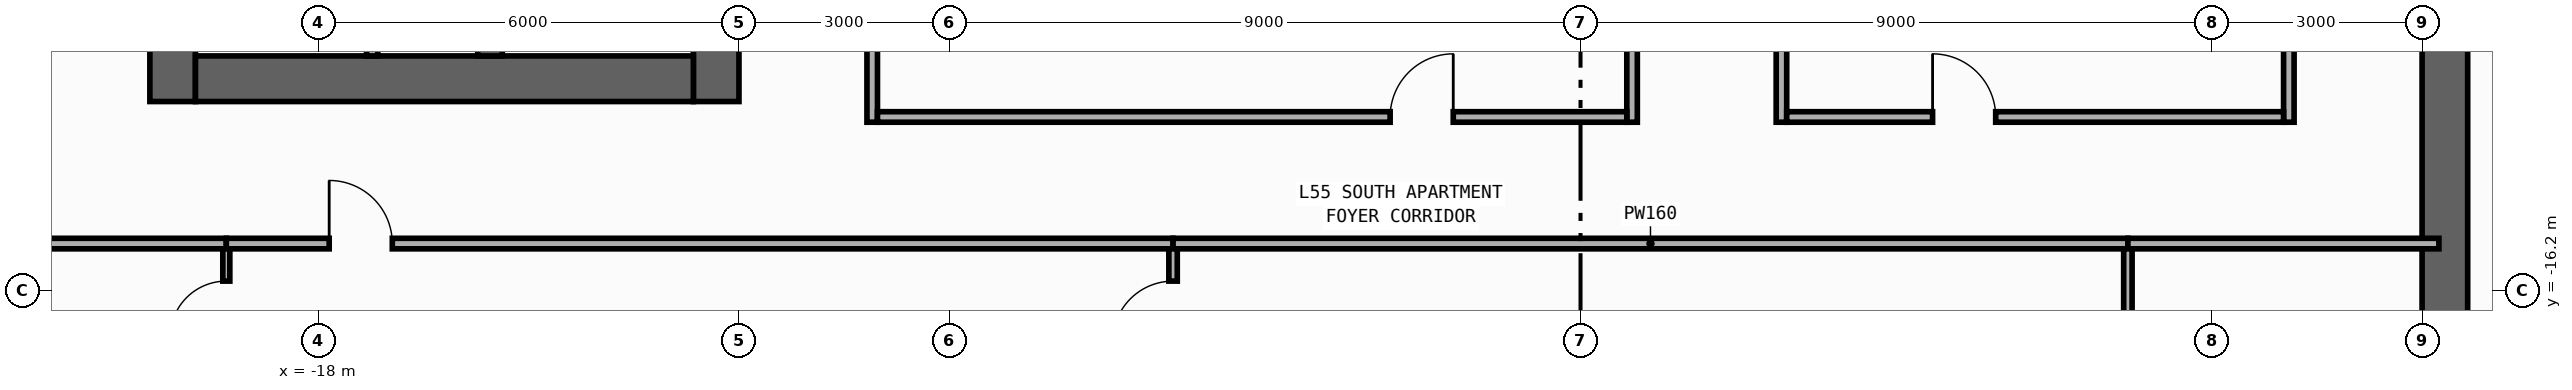
"""IFC4 building model, lengths in metres.
Left out: names, types, materials, properties, quantities, classifications, styles, units other than length and angle.
Written with IfcOpenShell. Run it as: python <this file> out.ifc"""

import sys

from ifc_helpers import new_model, si_unit, direction, frame, frame_2d, origin, place, context, subcontext, project, spatial, rectangle, extrude, element, fill, save


model = new_model("IFC4")
c1 = context("Model", 3, precision=1e-05, world=origin(), true_north=direction((0.0, 1.0)))
c2 = subcontext(c1, "Body", "Model", "MODEL_VIEW")
j1 = project(units=[si_unit("LENGTHUNIT", "METRE"), si_unit("PLANEANGLEUNIT", "RADIAN")], contexts=[c1])
p1 = place(None, origin())
s1 = spatial("IfcSite", under=j1, at=p1, CompositionType="ELEMENT")
p2 = place(p1, origin())
s2 = spatial("IfcBuilding", under=s1, at=p2, CompositionType="ELEMENT")
p3 = place(p2, frame((0.0, 0.0, 236.8)))
s3 = spatial("IfcBuildingStorey", under=s2, at=p3, CompositionType="ELEMENT", Elevation=236.8)
p4 = place(p3, frame((-20.075, -13.5, 0.0), z_axis=(0.0, 0.0, 1.0), x_axis=(0.0, 1.0, 0.0)))
e1 = element("IfcWall", 1, at=p4, inside=s3, PredefinedType="SHEAR", context=c2, shape_type="SweptSolid", body=[
    extrude(rectangle(XDim=27.0, YDim=0.65, at=frame_2d((13.5, 0.0))), origin(), (0.0, 0.0, 1.0), 3.34),
])
p5 = place(p3, frame((-12.325, -13.5, 0.0), z_axis=(0.0, 0.0, 1.0), x_axis=(0.0, 1.0, 0.0)))
e2 = element("IfcWall", 2, at=p5, inside=s3, PredefinedType="SHEAR", context=c2, shape_type="SweptSolid", body=[
    extrude(rectangle(XDim=27.0, YDim=0.65, at=frame_2d((13.5, 0.0))), origin(), (0.0, 0.0, 1.0), 3.34),
])
p6 = place(p5, frame((15.175, 0.0, 0.0)))
e3 = element("IfcOpeningElement", 3, at=p6, cuts=e2, PredefinedType="OPENING", context=c2, shape_type="SweptSolid", body=[
    extrude(rectangle(XDim=0.85, YDim=2.1, at=frame_2d((0.425, 1.05))), frame((0.0, 0.335, 0.0), z_axis=(0.0, -1.0, 0.0), x_axis=(1.0, 0.0, 0.0)), (0.0, 0.0, 1.0), 0.67),
])
p7 = place(p5, frame((21.275, 0.0, 0.0)))
e4 = element("IfcOpeningElement", 4, at=p7, cuts=e2, PredefinedType="OPENING", context=c2, shape_type="SweptSolid", body=[
    extrude(rectangle(XDim=0.85, YDim=2.1, at=frame_2d((0.425, 1.05))), frame((0.0, 0.335, 0.0), z_axis=(0.0, -1.0, 0.0), x_axis=(1.0, 0.0, 0.0)), (0.0, 0.0, 1.0), 0.67),
])
p8 = place(p5, frame((4.275, 0.0, 0.0)))
e5 = element("IfcOpeningElement", 5, at=p8, cuts=e2, PredefinedType="OPENING", context=c2, shape_type="SweptSolid", body=[
    extrude(rectangle(XDim=0.85, YDim=2.1, at=frame_2d((0.425, 1.05))), frame((0.0, 0.335, 0.0), z_axis=(0.0, -1.0, 0.0), x_axis=(1.0, 0.0, 0.0)), (0.0, 0.0, 1.0), 0.67),
])
p9 = place(p5, frame((10.275, 0.0, 0.0)))
e6 = element("IfcOpeningElement", 6, at=p9, cuts=e2, PredefinedType="OPENING", context=c2, shape_type="SweptSolid", body=[
    extrude(rectangle(XDim=0.85, YDim=2.1, at=frame_2d((0.425, 1.05))), frame((0.0, 0.335, 0.0), z_axis=(0.0, -1.0, 0.0), x_axis=(1.0, 0.0, 0.0)), (0.0, 0.0, 1.0), 0.67),
])
p10 = place(p5, frame((12.725, 0.0, 0.0)))
e7 = element("IfcOpeningElement", 7, at=p10, cuts=e2, PredefinedType="OPENING", context=c2, shape_type="SweptSolid", body=[
    extrude(rectangle(XDim=1.15, YDim=2.2, at=frame_2d((0.575, 1.1))), frame((0.0, 0.335, 0.0), z_axis=(0.0, -1.0, 0.0), x_axis=(1.0, 0.0, 0.0)), (0.0, 0.0, 1.0), 0.67),
])
p11 = place(p5, frame((1.625, 0.0, 0.0)))
e8 = element("IfcOpeningElement", 8, at=p11, cuts=e2, PredefinedType="OPENING", context=c2, shape_type="SweptSolid", body=[
    extrude(rectangle(XDim=0.85, YDim=2.1, at=frame_2d((0.425, 1.05))), frame((0.0, 0.335, 0.0), z_axis=(0.0, -1.0, 0.0), x_axis=(1.0, 0.0, 0.0)), (0.0, 0.0, 1.0), 0.67),
])
p12 = place(p3, frame((-19.75, -13.175, 0.0), z_axis=(0.0, 0.0, 1.0), x_axis=(1.0, 0.0, 0.0)))
e9 = element("IfcWall", 9, at=p12, inside=s3, PredefinedType="SHEAR", context=c2, shape_type="SweptSolid", body=[
    extrude(rectangle(XDim=7.1, YDim=0.65, at=frame_2d((3.55, 0.0))), origin(), (0.0, 0.0, 1.0), 3.34),
])
p13 = place(p3, frame((-15.55, -12.85, 0.0), z_axis=(0.0, 0.0, 1.0), x_axis=(0.0, 1.0, 0.0)))
e10 = element("IfcWall", 10, at=p13, inside=s3, PredefinedType="SHEAR", context=c2, shape_type="SweptSolid", body=[
    extrude(rectangle(XDim=25.7, YDim=0.35, at=frame_2d((12.85, 0.0))), origin(), (0.0, 0.0, 1.0), 3.34),
])
p14 = place(p13, frame((12.075, 0.0, 0.0)))
e11 = element("IfcOpeningElement", 11, at=p14, cuts=e10, PredefinedType="OPENING", context=c2, shape_type="SweptSolid", body=[
    extrude(rectangle(XDim=1.15, YDim=2.2, at=frame_2d((0.575, 1.1))), frame((0.0, 0.185, 0.0), z_axis=(0.0, -1.0, 0.0), x_axis=(1.0, 0.0, 0.0)), (0.0, 0.0, 1.0), 0.37),
])
p15 = place(p13, frame((0.975, 0.0, 0.0)))
e12 = element("IfcOpeningElement", 12, at=p15, cuts=e10, PredefinedType="OPENING", context=c2, shape_type="SweptSolid", body=[
    extrude(rectangle(XDim=0.85, YDim=2.1, at=frame_2d((0.425, 1.05))), frame((0.0, 0.185, 0.0), z_axis=(0.0, -1.0, 0.0), x_axis=(1.0, 0.0, 0.0)), (0.0, 0.0, 1.0), 0.37),
])
p16 = place(p3, frame((12.325, -19.8, 0.0), z_axis=(0.0, 0.0, 1.0), x_axis=(0.0, 1.0, 0.0)))
e13 = element("IfcWall", 13, at=p16, inside=s3, PredefinedType="SHEAR", context=c2, shape_type="SweptSolid", body=[
    extrude(rectangle(XDim=27.0, YDim=0.65, at=frame_2d((13.5, 0.0))), origin(), (0.0, 0.0, 1.0), 3.34),
])
p17 = place(p16, frame((23.05, 0.0, 0.0)))
e14 = element("IfcOpeningElement", 14, at=p17, cuts=e13, PredefinedType="OPENING", context=c2, shape_type="SweptSolid", body=[
    extrude(rectangle(XDim=1.1, YDim=2.2, at=frame_2d((0.55, 1.1))), frame((0.0, 0.335, 0.0), z_axis=(0.0, -1.0, 0.0), x_axis=(1.0, 0.0, 0.0)), (0.0, 0.0, 1.0), 0.67),
])
p18 = place(p16, frame((19.85, 0.0, 0.0)))
e15 = element("IfcOpeningElement", 15, at=p18, cuts=e13, PredefinedType="OPENING", context=c2, shape_type="SweptSolid", body=[
    extrude(rectangle(XDim=1.1, YDim=2.2, at=frame_2d((0.55, 1.1))), frame((0.0, 0.335, 0.0), z_axis=(0.0, -1.0, 0.0), x_axis=(1.0, 0.0, 0.0)), (0.0, 0.0, 1.0), 0.67),
])
p19 = place(p16, frame((16.65, 0.0, 0.0)))
e16 = element("IfcOpeningElement", 16, at=p19, cuts=e13, PredefinedType="OPENING", context=c2, shape_type="SweptSolid", body=[
    extrude(rectangle(XDim=1.1, YDim=2.2, at=frame_2d((0.55, 1.1))), frame((0.0, 0.335, 0.0), z_axis=(0.0, -1.0, 0.0), x_axis=(1.0, 0.0, 0.0)), (0.0, 0.0, 1.0), 0.67),
])
p20 = place(p16, frame((10.175, 0.0, 0.0)))
e17 = element("IfcOpeningElement", 17, at=p20, cuts=e13, PredefinedType="OPENING", context=c2, shape_type="SweptSolid", body=[
    extrude(rectangle(XDim=0.85, YDim=2.1, at=frame_2d((0.425, 1.05))), frame((0.0, 0.335, 0.0), z_axis=(0.0, -1.0, 0.0), x_axis=(1.0, 0.0, 0.0)), (0.0, 0.0, 1.0), 0.67),
])
p21 = place(p16, frame((12.725, 0.0, 0.0)))
e18 = element("IfcOpeningElement", 18, at=p21, cuts=e13, PredefinedType="OPENING", context=c2, shape_type="SweptSolid", body=[
    extrude(rectangle(XDim=1.15, YDim=2.2, at=frame_2d((0.575, 1.1))), frame((0.0, 0.335, 0.0), z_axis=(0.0, -1.0, 0.0), x_axis=(1.0, 0.0, 0.0)), (0.0, 0.0, 1.0), 0.67),
])
p22 = place(p16, frame((25.125, 0.0, 0.0)))
e19 = element("IfcOpeningElement", 19, at=p22, cuts=e13, PredefinedType="OPENING", context=c2, shape_type="SweptSolid", body=[
    extrude(rectangle(XDim=0.85, YDim=2.1, at=frame_2d((0.425, 1.05))), frame((0.0, 0.335, 0.0), z_axis=(0.0, -1.0, 0.0), x_axis=(1.0, 0.0, 0.0)), (0.0, 0.0, 1.0), 0.67),
])
p23 = place(p3, frame((-17.23, -12.85, 0.0), z_axis=(0.0, 0.0, 1.0), x_axis=(0.0, 1.0, 0.0)))
e20 = element("IfcWall", 20, at=p23, inside=s3, PredefinedType="PARTITIONING", context=c2, shape_type="SweptSolid", body=[
    extrude(rectangle(XDim=2.38, YDim=0.16, at=frame_2d((1.19, 0.0))), origin(), (0.0, 0.0, 1.0), 3.34),
])
p24 = place(p23, frame((0.46, 0.0, 0.0)))
e21 = element("IfcOpeningElement", 21, at=p24, cuts=e20, PredefinedType="OPENING", context=c2, shape_type="SweptSolid", body=[
    extrude(rectangle(XDim=0.85, YDim=2.1, at=frame_2d((0.425, 1.05))), frame((0.0, 0.09, 0.0), z_axis=(0.0, -1.0, 0.0), x_axis=(1.0, 0.0, 0.0)), (0.0, 0.0, 1.0), 0.18),
])
p25 = place(p3, frame((-10.1, -13.795, 0.0), z_axis=(0.0, 0.0, 1.0), x_axis=(0.0, 1.0, 0.0)))
e22 = element("IfcWall", 22, at=p25, inside=s3, PredefinedType="PARTITIONING", context=c2, shape_type="SweptSolid", body=[
    extrude(rectangle(XDim=14.205, YDim=0.15, at=frame_2d((7.103, 0.0))), origin(), (0.0, 0.0, 1.0), 3.34),
])
p26 = place(p25, frame((7.972, 0.0, 0.0)))
e23 = element("IfcOpeningElement", 23, at=p26, cuts=e22, PredefinedType="OPENING", context=c2, shape_type="SweptSolid", body=[
    extrude(rectangle(XDim=0.9, YDim=2.15, at=frame_2d((0.45, 1.075))), frame((0.0, 0.085, 0.0), z_axis=(0.0, -1.0, 0.0), x_axis=(1.0, 0.0, 0.0)), (0.0, 0.0, 1.0), 0.17),
])
p27 = place(p3, frame((10.1, -13.795, 0.0), z_axis=(0.0, 0.0, 1.0), x_axis=(0.0, 1.0, 0.0)))
e24 = element("IfcWall", 24, at=p27, inside=s3, PredefinedType="PARTITIONING", context=c2, shape_type="SweptSolid", body=[
    extrude(rectangle(XDim=11.575, YDim=0.15, at=frame_2d((5.788, 0.0))), origin(), (0.0, 0.0, 1.0), 3.34),
])
p28 = place(p27, frame((7.979, 0.0, 0.0)))
e25 = element("IfcOpeningElement", 25, at=p28, cuts=e24, PredefinedType="OPENING", context=c2, shape_type="SweptSolid", body=[
    extrude(rectangle(XDim=0.9, YDim=2.15, at=frame_2d((0.45, 1.075))), frame((0.0, 0.085, 0.0), z_axis=(0.0, -1.0, 0.0), x_axis=(1.0, 0.0, 0.0)), (0.0, 0.0, 1.0), 0.17),
])
p29 = place(p3, frame((0.735, -13.795, 0.0), z_axis=(0.0, 0.0, 1.0), x_axis=(0.0, 1.0, 0.0)))
e26 = element("IfcWall", 26, at=p29, inside=s3, PredefinedType="PARTITIONING", context=c2, shape_type="SweptSolid", body=[
    extrude(rectangle(XDim=14.055, YDim=0.15, at=frame_2d((7.027, 0.0))), origin(), (0.0, 0.0, 1.0), 3.34),
])
p30 = place(p29, frame((7.881, 0.0, 0.0)))
e27 = element("IfcOpeningElement", 27, at=p30, cuts=e26, PredefinedType="OPENING", context=c2, shape_type="SweptSolid", body=[
    extrude(rectangle(XDim=0.9, YDim=2.15, at=frame_2d((0.45, 1.075))), frame((0.0, 0.085, 0.0), z_axis=(0.0, -1.0, 0.0), x_axis=(1.0, 0.0, 0.0)), (0.0, 0.0, 1.0), 0.17),
])
p31 = place(p3, frame((2.865, -13.795, 0.0), z_axis=(0.0, 0.0, 1.0), x_axis=(0.0, 1.0, 0.0)))
e28 = element("IfcWall", 28, at=p31, inside=s3, PredefinedType="PARTITIONING", context=c2, shape_type="SweptSolid", body=[
    extrude(rectangle(XDim=11.415, YDim=0.15, at=frame_2d((5.708, 0.0))), origin(), (0.0, 0.0, 1.0), 3.34),
])
p32 = place(p31, frame((8.013, 0.0, 0.0)))
e29 = element("IfcOpeningElement", 29, at=p32, cuts=e28, PredefinedType="OPENING", context=c2, shape_type="SweptSolid", body=[
    extrude(rectangle(XDim=0.9, YDim=2.15, at=frame_2d((0.45, 1.075))), frame((0.0, 0.085, 0.0), z_axis=(0.0, -1.0, 0.0), x_axis=(1.0, 0.0, 0.0)), (0.0, 0.0, 1.0), 0.17),
])
p33 = place(p3, frame((-21.955, -15.525, 0.0), z_axis=(0.0, 0.0, 1.0), x_axis=(1.0, 0.0, 0.0)))
e30 = element("IfcWall", 30, at=p33, inside=s3, PredefinedType="PARTITIONING", context=c2, shape_type="SweptSolid", body=[
    extrude(rectangle(XDim=2.645, YDim=0.15, at=frame_2d((1.323, 0.0))), origin(), (0.0, 0.0, 1.0), 3.34),
])
p34 = place(p3, frame((-19.31, -15.525, 0.0), z_axis=(0.0, 0.0, 1.0), x_axis=(1.0, 0.0, 0.0)))
e31 = element("IfcWall", 31, at=p34, inside=s3, PredefinedType="PARTITIONING", context=c2, shape_type="SweptSolid", body=[
    extrude(rectangle(XDim=13.5, YDim=0.15, at=frame_2d((6.75, 0.0))), origin(), (0.0, 0.0, 1.0), 3.34),
])
p35 = place(p34, frame((1.467, 0.0, 0.0)))
e32 = element("IfcOpeningElement", 32, at=p35, cuts=e31, PredefinedType="OPENING", context=c2, shape_type="SweptSolid", body=[
    extrude(rectangle(XDim=0.9, YDim=2.15, at=frame_2d((0.45, 1.075))), frame((0.0, 0.085, 0.0), z_axis=(0.0, -1.0, 0.0), x_axis=(1.0, 0.0, 0.0)), (0.0, 0.0, 1.0), 0.17),
])
p36 = place(p3, frame((-5.81, -15.525, 0.0), z_axis=(0.0, 0.0, 1.0), x_axis=(1.0, 0.0, 0.0)))
e33 = element("IfcWall", 33, at=p36, inside=s3, PredefinedType="PARTITIONING", context=c2, shape_type="SweptSolid", body=[
    extrude(rectangle(XDim=13.615, YDim=0.15, at=frame_2d((6.808, 0.0))), origin(), (0.0, 0.0, 1.0), 3.34),
])
p37 = place(p3, frame((7.805, -15.525, 0.0), z_axis=(0.0, 0.0, 1.0), x_axis=(1.0, 0.0, 0.0)))
e34 = element("IfcWall", 34, at=p37, inside=s3, PredefinedType="PARTITIONING", context=c2, shape_type="SweptSolid", body=[
    extrude(rectangle(XDim=4.435, YDim=0.15, at=frame_2d((2.218, 0.0))), origin(), (0.0, 0.0, 1.0), 3.34),
])
p38 = place(p3, frame((-10.025, -13.72, 0.0), z_axis=(0.0, 0.0, 1.0), x_axis=(1.0, 0.0, 0.0)))
e35 = element("IfcWall", 35, at=p38, inside=s3, PredefinedType="PARTITIONING", context=c2, shape_type="SweptSolid", body=[
    extrude(rectangle(XDim=10.685, YDim=0.15, at=frame_2d((5.342, 0.0))), origin(), (0.0, 0.0, 1.0), 3.34),
])
p39 = place(p38, frame((7.31, 0.0, 0.0)))
e36 = element("IfcOpeningElement", 36, at=p39, cuts=e35, PredefinedType="OPENING", context=c2, shape_type="SweptSolid", body=[
    extrude(rectangle(XDim=0.9, YDim=2.15, at=frame_2d((0.45, 1.075))), frame((0.0, 0.085, 0.0), z_axis=(0.0, -1.0, 0.0), x_axis=(1.0, 0.0, 0.0)), (0.0, 0.0, 1.0), 0.17),
])
p40 = place(p3, frame((2.94, -13.72, 0.0), z_axis=(0.0, 0.0, 1.0), x_axis=(1.0, 0.0, 0.0)))
e37 = element("IfcWall", 37, at=p40, inside=s3, PredefinedType="PARTITIONING", context=c2, shape_type="SweptSolid", body=[
    extrude(rectangle(XDim=7.085, YDim=0.15, at=frame_2d((3.542, 0.0))), origin(), (0.0, 0.0, 1.0), 3.34),
])
p41 = place(p40, frame((2.08, 0.0, 0.0)))
e38 = element("IfcOpeningElement", 38, at=p41, cuts=e37, PredefinedType="OPENING", context=c2, shape_type="SweptSolid", body=[
    extrude(rectangle(XDim=0.9, YDim=2.15, at=frame_2d((0.45, 1.075))), frame((0.0, 0.085, 0.0), z_axis=(0.0, -1.0, 0.0), x_axis=(1.0, 0.0, 0.0)), (0.0, 0.0, 1.0), 0.17),
])
p42 = place(p3, frame((-19.31, -18.1, 0.0), z_axis=(0.0, 0.0, 1.0), x_axis=(0.0, 1.0, 0.0)))
e39 = element("IfcWall", 39, at=p42, inside=s3, PredefinedType="PARTITIONING", context=c2, shape_type="SweptSolid", body=[
    extrude(rectangle(XDim=2.5, YDim=0.1, at=frame_2d((1.25, 0.0))), origin(), (0.0, 0.0, 1.0), 3.34),
])
p43 = place(p42, frame((1.24, 0.0, 0.0)))
e40 = element("IfcOpeningElement", 40, at=p43, cuts=e39, PredefinedType="OPENING", context=c2, shape_type="SweptSolid", body=[
    extrude(rectangle(XDim=0.8, YDim=2.1, at=frame_2d((0.4, 1.05))), frame((0.0, 0.06, 0.0), z_axis=(0.0, -1.0, 0.0), x_axis=(1.0, 0.0, 0.0)), (0.0, 0.0, 1.0), 0.12),
])
p44 = place(p3, frame((-5.81, -20.1, 0.0), z_axis=(0.0, 0.0, 1.0), x_axis=(0.0, 1.0, 0.0)))
e41 = element("IfcWall", 41, at=p44, inside=s3, PredefinedType="PARTITIONING", context=c2, shape_type="SweptSolid", body=[
    extrude(rectangle(XDim=4.5, YDim=0.12, at=frame_2d((2.25, 0.0))), origin(), (0.0, 0.0, 1.0), 3.34),
])
p45 = place(p44, frame((3.18, 0.0, 0.0)))
e42 = element("IfcOpeningElement", 42, at=p45, cuts=e41, PredefinedType="OPENING", context=c2, shape_type="SweptSolid", body=[
    extrude(rectangle(XDim=0.86, YDim=2.15, at=frame_2d((0.43, 1.075))), frame((0.0, 0.07, 0.0), z_axis=(0.0, -1.0, 0.0), x_axis=(1.0, 0.0, 0.0)), (0.0, 0.0, 1.0), 0.14),
])
p46 = place(p3, frame((7.805, -24.735, 0.0), z_axis=(0.0, 0.0, 1.0), x_axis=(0.0, 1.0, 0.0)))
e43 = element("IfcWall", 43, at=p46, inside=s3, PredefinedType="PARTITIONING", context=c2, shape_type="SweptSolid", body=[
    extrude(rectangle(XDim=9.135, YDim=0.12, at=frame_2d((4.568, 0.0))), origin(), (0.0, 0.0, 1.0), 3.34),
])
p47 = place(p46, frame((0.46, 0.0, 0.0)))
e44 = element("IfcOpeningElement", 44, at=p47, cuts=e43, PredefinedType="OPENING", context=c2, shape_type="SweptSolid", body=[
    extrude(rectangle(XDim=0.8, YDim=2.1, at=frame_2d((0.4, 1.05))), frame((0.0, 0.07, 0.0), z_axis=(0.0, -1.0, 0.0), x_axis=(1.0, 0.0, 0.0)), (0.0, 0.0, 1.0), 0.14),
])
p48 = place(p35, origin())
e45 = element("IfcDoor", 45, at=p48, inside=s3, OperationType="SINGLE_SWING_LEFT", PredefinedType="DOOR", context=c2, shape_type="SweptSolid", body=[
    extrude(rectangle(XDim=0.9, YDim=2.15, at=frame_2d((0.45, 1.075))), frame((0.0, 0.025, 0.0), z_axis=(0.0, -1.0, 0.0), x_axis=(1.0, 0.0, 0.0)), (0.0, 0.0, 1.0), 0.05),
])
fill(e32, e45)
p49 = place(p39, origin())
e46 = element("IfcDoor", 46, at=p49, inside=s3, OperationType="SINGLE_SWING_RIGHT", PredefinedType="DOOR", context=c2, shape_type="SweptSolid", body=[
    extrude(rectangle(XDim=0.9, YDim=2.15, at=frame_2d((0.45, 1.075))), frame((0.0, 0.025, 0.0), z_axis=(0.0, -1.0, 0.0), x_axis=(1.0, 0.0, 0.0)), (0.0, 0.0, 1.0), 0.05),
])
fill(e36, e46)
p50 = place(p41, origin())
e47 = element("IfcDoor", 47, at=p50, inside=s3, OperationType="SINGLE_SWING_LEFT", PredefinedType="DOOR", context=c2, shape_type="SweptSolid", body=[
    extrude(rectangle(XDim=0.9, YDim=2.15, at=frame_2d((0.45, 1.075))), frame((0.0, 0.025, 0.0), z_axis=(0.0, -1.0, 0.0), x_axis=(1.0, 0.0, 0.0)), (0.0, 0.0, 1.0), 0.05),
])
fill(e38, e47)
p51 = place(p43, origin())
e48 = element("IfcDoor", 48, at=p51, inside=s3, OperationType="SINGLE_SWING_LEFT", PredefinedType="DOOR", context=c2, shape_type="SweptSolid", body=[
    extrude(rectangle(XDim=0.8, YDim=2.1, at=frame_2d((0.4, 1.05))), frame((0.0, 0.025, 0.0), z_axis=(0.0, -1.0, 0.0), x_axis=(1.0, 0.0, 0.0)), (0.0, 0.0, 1.0), 0.05),
])
fill(e40, e48)
p52 = place(p45, origin())
e49 = element("IfcDoor", 49, at=p52, inside=s3, OperationType="SINGLE_SWING_LEFT", PredefinedType="DOOR", context=c2, shape_type="SweptSolid", body=[
    extrude(rectangle(XDim=0.86, YDim=2.15, at=frame_2d((0.43, 1.075))), frame((0.0, 0.025, 0.0), z_axis=(0.0, -1.0, 0.0), x_axis=(1.0, 0.0, 0.0)), (0.0, 0.0, 1.0), 0.05),
])
fill(e42, e49)
save(model, sys.argv[1])
